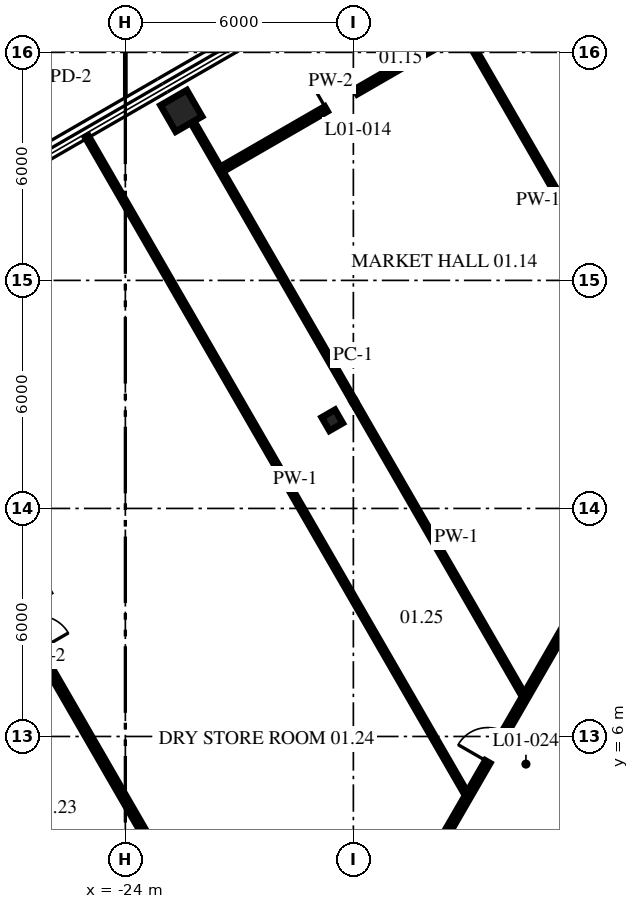
"""IFC4 building model, lengths in metres.
Left out: names, types, materials, properties, quantities, classifications, styles, units other than length and angle.
Written with IfcOpenShell. Run it as: python <this file> out.ifc"""

import sys

from ifc_helpers import new_model, si_unit, direction, frame, frame_2d, origin, origin_2d, place, context, subcontext, project, spatial, rectangle, i_section, extrude, source, transform, mapped, element, fill, save


model = new_model("IFC4")
c1 = context("Model", 3, precision=1e-05, world=origin(), true_north=direction((0.0, 1.0)))
c2 = subcontext(c1, "Body", "Model", "MODEL_VIEW")
j1 = project(units=[si_unit("LENGTHUNIT", "METRE"), si_unit("PLANEANGLEUNIT", "RADIAN")], contexts=[c1])
p1 = place(None, origin())
s1 = spatial("IfcSite", under=j1, at=p1, CompositionType="ELEMENT")
p2 = place(p1, origin())
s2 = spatial("IfcBuilding", under=s1, at=p2, CompositionType="ELEMENT")
p3 = place(p2, frame((0.0, 0.0, 7.0)))
s3 = spatial("IfcBuildingStorey", under=s2, at=p3, CompositionType="ELEMENT", Elevation=7.0)
m1 = source(origin(), c2, "Body", "SweptSolid", [
    extrude(i_section(OverallWidth=0.404, OverallDepth=0.406, WebThickness=0.027, FlangeThickness=0.044, at=origin_2d()), origin(), (0.0, 0.0, 1.0), 4.5),
])
p4 = place(p3, frame((-18.556, 14.32, 0.0), z_axis=(0.0, 0.0, 1.0), x_axis=(-0.866025403784, -0.5, 0.0)))
e1 = element("IfcColumn", 1, at=p4, inside=s3, PredefinedType="COLUMN", context=c2, shape_type="MappedRepresentation", body=[
    mapped(m1, transform((0.0, 0.0, 0.0), scale=1.0)),
])
m2 = source(origin(), c2, "Body", "SweptSolid", [
    extrude(rectangle(XDim=0.8, YDim=0.8, at=origin_2d()), origin(), (0.0, 0.0, 1.0), 4.5),
])
p5 = place(p3, frame((-22.528, 22.46, 0.0), z_axis=(0.0, 0.0, 1.0), x_axis=(-0.866025403784, -0.5, 0.0)))
e2 = element("IfcColumn", 2, at=p5, inside=s3, PredefinedType="COLUMN", context=c2, shape_type="MappedRepresentation", body=[
    mapped(m2, transform((0.0, 0.0, 0.0), scale=1.0)),
])
p6 = place(p3, frame((-31.817, 17.864, 0.0), z_axis=(0.0, 0.0, 1.0), x_axis=(0.500001119364, -0.866024757518, 0.0)))
e3 = element("IfcWall", 3, at=p6, inside=s3, PredefinedType="PARTITIONING", context=c2, shape_type="SweptSolid", body=[
    extrude(rectangle(XDim=20.628, YDim=0.15, at=frame_2d((10.314, 0.0))), origin(), (0.0, 0.0, 1.0), 4.3),
])
p7 = place(p6, frame((10.175, 0.0, 0.0)))
e4 = element("IfcOpeningElement", 4, at=p7, cuts=e3, PredefinedType="OPENING", context=c2, shape_type="SweptSolid", body=[
    extrude(rectangle(XDim=0.9, YDim=2.1, at=frame_2d((0.45, 1.05))), frame((0.0, 0.085, 0.0), z_axis=(0.0, -1.0, 0.0), x_axis=(1.0, 0.0, 0.0)), (0.0, 0.0, 1.0), 0.17),
])
m3 = source(origin(), c2, "Body", "SweptSolid", [
    extrude(rectangle(XDim=20.055, YDim=0.1, at=frame_2d((10.027, 0.0))), origin(), (0.0, 0.0, 1.0), 4.3),
])
p8 = place(p3, frame((-25.017, 21.79, 0.0), z_axis=(0.0, 0.0, 1.0), x_axis=(0.50000802728, -0.866020769183, 0.0)))
e5 = element("IfcWall", 5, at=p8, inside=s3, PredefinedType="PARTITIONING", context=c2, shape_type="MappedRepresentation", body=[
    mapped(m3, transform((0.0, 0.0, 0.0), scale=1.0)),
])
m4 = source(origin(), c2, "Body", "SweptSolid", [
    extrude(rectangle(XDim=8.49, YDim=0.1, at=frame_2d((4.245, 0.0))), origin(), (0.0, 0.0, 1.0), 3.528),
])
p9 = place(p3, frame((-22.238, 22.177, 0.0), z_axis=(0.0, 0.0, 1.0), x_axis=(0.500007862672, -0.866020864221, 0.0)))
e6 = element("IfcWall", 6, at=p9, inside=s3, PredefinedType="PARTITIONING", context=c2, shape_type="MappedRepresentation", body=[
    mapped(m4, transform((0.0, 0.0, 0.0), scale=1.0)),
])
m5 = source(origin(), c2, "Body", "SweptSolid", [
    extrude(rectangle(XDim=8.919, YDim=0.1, at=frame_2d((4.459, 0.0))), origin(), (0.0, 0.0, 1.0), 4.3),
])
p10 = place(p3, frame((-17.993, 14.824, 0.0), z_axis=(0.0, 0.0, 1.0), x_axis=(0.499995733566, -0.866027866997, 0.0)))
e7 = element("IfcWall", 7, at=p10, inside=s3, PredefinedType="PARTITIONING", context=c2, shape_type="MappedRepresentation", body=[
    mapped(m5, transform((0.0, 0.0, 0.0), scale=1.0)),
])
m6 = source(origin(), c2, "Body", "SweptSolid", [
    extrude(rectangle(XDim=14.21, YDim=0.1, at=frame_2d((7.105, 0.0))), origin(), (0.0, 0.0, 1.0), 4.3),
])
p11 = place(p3, frame((-16.384, 26.774, 0.0), z_axis=(0.0, 0.0, 1.0), x_axis=(0.499988175011, -0.866032230837, 0.0)))
e8 = element("IfcWall", 8, at=p11, inside=s3, PredefinedType="PARTITIONING", context=c2, shape_type="MappedRepresentation", body=[
    mapped(m6, transform((0.0, 0.0, 0.0), scale=1.0)),
])
p12 = place(p3, frame((-21.477, 20.918, 0.0), z_axis=(0.0, 0.0, 1.0), x_axis=(0.866028707355, 0.499994278004, 0.0)))
e9 = element("IfcWall", 9, at=p12, inside=s3, PredefinedType="PARTITIONING", context=c2, shape_type="SweptSolid", body=[
    extrude(rectangle(XDim=7.308, YDim=0.15, at=frame_2d((3.654, 0.0))), origin(), (0.0, 0.0, 1.0), 4.3),
])
p13 = place(p12, frame((3.188, 0.0, 0.0)))
e10 = element("IfcOpeningElement", 10, at=p13, cuts=e9, PredefinedType="OPENING", context=c2, shape_type="SweptSolid", body=[
    extrude(rectangle(XDim=0.9, YDim=2.1, at=frame_2d((0.45, 1.05))), frame((0.0, 0.085, 0.0), z_axis=(0.0, -1.0, 0.0), x_axis=(1.0, 0.0, 0.0)), (0.0, 0.0, 1.0), 0.17),
])
p14 = place(p3, frame((-17.518, 0.044, 0.0), z_axis=(0.0, 0.0, 1.0), x_axis=(0.500011872673, 0.866018548985, 0.0)))
e11 = element("IfcWall", 11, at=p14, inside=s3, PredefinedType="PARTITIONING", context=c2, shape_type="SweptSolid", body=[
    extrude(rectangle(XDim=17.452, YDim=0.15, at=frame_2d((8.726, 0.0))), origin(), (0.0, 0.0, 1.0), 4.3),
])
p15 = place(p14, frame((11.417, 0.0, 0.0)))
e12 = element("IfcOpeningElement", 12, at=p15, cuts=e11, PredefinedType="OPENING", context=c2, shape_type="SweptSolid", body=[
    extrude(rectangle(XDim=1.8, YDim=2.4, at=frame_2d((0.9, 1.2))), frame((0.0, 0.085, 0.0), z_axis=(0.0, -1.0, 0.0), x_axis=(1.0, 0.0, 0.0)), (0.0, 0.0, 1.0), 0.17),
])
p16 = place(p14, frame((2.006, 0.0, 0.0)))
e13 = element("IfcOpeningElement", 13, at=p16, cuts=e11, PredefinedType="OPENING", context=c2, shape_type="SweptSolid", body=[
    extrude(rectangle(XDim=0.9, YDim=2.1, at=frame_2d((0.45, 1.05))), frame((0.0, 0.085, 0.0), z_axis=(0.0, -1.0, 0.0), x_axis=(1.0, 0.0, 0.0)), (0.0, 0.0, 1.0), 0.17),
])
p17 = place(p14, frame((6.108, 0.0, 0.0)))
e14 = element("IfcOpeningElement", 14, at=p17, cuts=e11, PredefinedType="OPENING", context=c2, shape_type="SweptSolid", body=[
    extrude(rectangle(XDim=0.9, YDim=2.1, at=frame_2d((0.45, 1.05))), frame((0.0, 0.085, 0.0), z_axis=(0.0, -1.0, 0.0), x_axis=(1.0, 0.0, 0.0)), (0.0, 0.0, 1.0), 0.17),
])
p18 = place(p13, origin())
e15 = element("IfcDoor", 15, at=p18, inside=s3, OperationType="SINGLE_SWING_LEFT", PredefinedType="DOOR", context=c2, shape_type="SweptSolid", body=[
    extrude(rectangle(XDim=0.9, YDim=2.1, at=frame_2d((0.45, 1.05))), frame((0.0, 0.025, 0.0), z_axis=(0.0, -1.0, 0.0), x_axis=(1.0, 0.0, 0.0)), (0.0, 0.0, 1.0), 0.05),
])
fill(e10, e15)
p19 = place(p17, origin())
e16 = element("IfcDoor", 16, at=p19, inside=s3, OperationType="SINGLE_SWING_LEFT", PredefinedType="DOOR", context=c2, shape_type="SweptSolid", body=[
    extrude(rectangle(XDim=0.9, YDim=2.1, at=frame_2d((0.45, 1.05))), frame((0.0, 0.025, 0.0), z_axis=(0.0, -1.0, 0.0), x_axis=(1.0, 0.0, 0.0)), (0.0, 0.0, 1.0), 0.05),
])
fill(e14, e16)
save(model, sys.argv[1])
